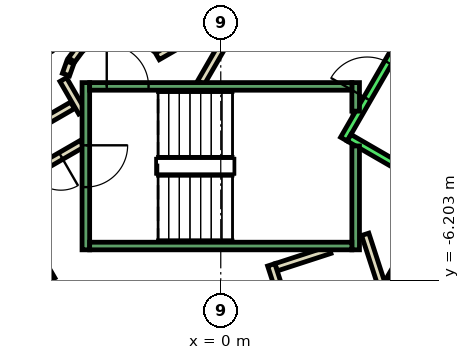
"""IFC4 building model, lengths in metres.
Left out: names, types, materials, properties, quantities, classifications, styles, units other than length and angle.
Written with IfcOpenShell. Run it as: python <this file> out.ifc"""

import sys

from ifc_helpers import new_model, si_unit, direction, frame, frame_2d, origin, place, context, subcontext, project, spatial, rectangle, extrude, element, fill, save


model = new_model("IFC4")
c1 = context("Model", 3, precision=1e-05, world=origin(), true_north=direction((0.0, 1.0)))
c2 = subcontext(c1, "Body", "Model", "MODEL_VIEW")
j1 = project(units=[si_unit("LENGTHUNIT", "METRE"), si_unit("PLANEANGLEUNIT", "RADIAN")], contexts=[c1])
p1 = place(None, origin())
s1 = spatial("IfcSite", under=j1, at=p1, CompositionType="ELEMENT")
p2 = place(p1, origin())
s2 = spatial("IfcBuilding", under=s1, at=p2, CompositionType="ELEMENT")
p3 = place(p2, frame((0.0, 0.0, 30.0)))
s3 = spatial("IfcBuildingStorey", under=s2, at=p3, CompositionType="ELEMENT", Elevation=30.0)
p4 = place(p3, frame((-3.9, -1.599, 0.0), z_axis=(0.0, 0.0, 1.0), x_axis=(-0.865969445389, -0.500096910261, 0.0)))
e1 = element("IfcWall", 1, at=p4, inside=s3, PredefinedType="PARTITIONING", context=c2, shape_type="SweptSolid", body=[
    extrude(rectangle(XDim=1.373, YDim=0.2, at=frame_2d((0.687, 0.0))), origin(), (0.0, 0.0, 1.0), 4.4),
])
p5 = place(p3, frame((-4.145, -0.92, 0.0), z_axis=(0.0, 0.0, 1.0), x_axis=(0.499743786207, -0.866173278362, 0.0)))
e2 = element("IfcWall", 2, at=p5, inside=s3, PredefinedType="PARTITIONING", context=c2, shape_type="SweptSolid", body=[
    extrude(rectangle(XDim=0.991, YDim=0.2, at=frame_2d((0.495, 0.0))), origin(), (0.0, 0.0, 1.0), 4.4),
])
p6 = place(p3, frame((-3.65, -2.61, 0.0), z_axis=(0.0, 0.0, 1.0), x_axis=(-0.866072462134, -0.499918483688, 0.0)))
e3 = element("IfcWall", 3, at=p6, inside=s3, PredefinedType="PARTITIONING", context=c2, shape_type="SweptSolid", body=[
    extrude(rectangle(XDim=2.084, YDim=0.2, at=frame_2d((1.042, 0.0))), origin(), (0.0, 0.0, 1.0), 4.4),
])
p7 = place(p6, frame((0.642, 0.0, 0.0)))
e4 = element("IfcOpeningElement", 4, at=p7, cuts=e3, PredefinedType="OPENING", context=c2, shape_type="SweptSolid", body=[
    extrude(rectangle(XDim=0.9, YDim=2.1, at=frame_2d((0.45, 1.05))), frame((0.0, 0.11, 0.0), z_axis=(0.0, -1.0, 0.0), x_axis=(1.0, 0.0, 0.0)), (0.0, 0.0, 1.0), 0.22),
])
p8 = place(p3, frame((2.869, -5.4, 0.0), z_axis=(0.0, 0.0, 1.0), x_axis=(-0.950892787506, -0.309520446287, 0.0)))
e5 = element("IfcWall", 5, at=p8, inside=s3, PredefinedType="PARTITIONING", context=c2, shape_type="SweptSolid", body=[
    extrude(rectangle(XDim=1.487, YDim=0.2, at=frame_2d((0.743, 0.0))), origin(), (0.0, 0.0, 1.0), 4.4),
])
p9 = place(p3, frame((1.328, -5.795, 0.0), z_axis=(0.0, 0.0, 1.0), x_axis=(0.309171157328, -0.951006411901, 0.0)))
e6 = element("IfcWall", 6, at=p9, inside=s3, PredefinedType="PARTITIONING", context=c2, shape_type="SweptSolid", body=[
    extrude(rectangle(XDim=2.401, YDim=0.2, at=frame_2d((1.2, 0.0))), origin(), (0.0, 0.0, 1.0), 4.4),
])
p10 = place(p9, frame((0.75, 0.0, 0.0)))
e7 = element("IfcOpeningElement", 7, at=p10, cuts=e6, PredefinedType="OPENING", context=c2, shape_type="SweptSolid", body=[
    extrude(rectangle(XDim=0.9, YDim=2.1, at=frame_2d((0.45, 1.05))), frame((0.0, 0.11, 0.0), z_axis=(0.0, -1.0, 0.0), x_axis=(1.0, 0.0, 0.0)), (0.0, 0.0, 1.0), 0.22),
])
p11 = place(p3, frame((4.543, -7.275, 0.0), z_axis=(0.0, 0.0, 1.0), x_axis=(-0.309079173229, 0.951036310914, 0.0)))
e8 = element("IfcWall", 8, at=p11, inside=s3, PredefinedType="PARTITIONING", context=c2, shape_type="SweptSolid", body=[
    extrude(rectangle(XDim=2.4, YDim=0.2, at=frame_2d((1.2, 0.0))), origin(), (0.0, 0.0, 1.0), 4.4),
])
p12 = place(p3, frame((-0.52, -1.0, 0.0), z_axis=(0.0, 0.0, 1.0), x_axis=(0.50011622646, 0.865958290007, 0.0)))
e9 = element("IfcWall", 9, at=p12, inside=s3, PredefinedType="PARTITIONING", context=c2, shape_type="SweptSolid", body=[
    extrude(rectangle(XDim=4.991, YDim=0.2, at=frame_2d((2.496, 0.0))), origin(), (0.0, 0.0, 1.0), 4.4),
])
p13 = place(p12, frame((1.945, 0.0, 0.0)))
e10 = element("IfcOpeningElement", 10, at=p13, cuts=e9, PredefinedType="OPENING", context=c2, shape_type="SweptSolid", body=[
    extrude(rectangle(XDim=1.0, YDim=2.1, at=frame_2d((0.5, 1.05))), frame((0.0, 0.11, 0.0), z_axis=(0.0, -1.0, 0.0), x_axis=(1.0, 0.0, 0.0)), (0.0, 0.0, 1.0), 0.22),
])
p14 = place(p3, frame((-0.412, 0.414, 0.0), z_axis=(0.0, 0.0, 1.0), x_axis=(-0.866017369001, -0.500013916395, 0.0)))
e11 = element("IfcWall", 11, at=p14, inside=s3, PredefinedType="PARTITIONING", context=c2, shape_type="SweptSolid", body=[
    extrude(rectangle(XDim=1.45, YDim=0.2, at=frame_2d((0.725, 0.0))), origin(), (0.0, 0.0, 1.0), 4.4),
])
p15 = place(p3, frame((-3.723, -0.131, 0.0), z_axis=(0.0, 0.0, 1.0), x_axis=(-0.594675113454, -0.803966112121, 0.0)))
e12 = element("IfcWall", 12, at=p15, inside=s3, PredefinedType="PARTITIONING", context=c2, shape_type="SweptSolid", body=[
    extrude(rectangle(XDim=0.338, YDim=0.2, at=frame_2d((0.169, 0.0))), origin(), (0.0, 0.0, 1.0), 4.4),
])
p16 = place(p3, frame((-3.96, -0.47, 0.0), z_axis=(0.0, 0.0, 1.0), x_axis=(-0.334824194261, -0.942280615813, 0.0)))
e13 = element("IfcWall", 13, at=p16, inside=s3, PredefinedType="PARTITIONING", context=c2, shape_type="SweptSolid", body=[
    extrude(rectangle(XDim=0.338, YDim=0.2, at=frame_2d((0.169, 0.0))), origin(), (0.0, 0.0, 1.0), 4.4),
])
p17 = place(p3, frame((-9.751, 2.99, 0.0), z_axis=(0.0, 0.0, 1.0), x_axis=(0.50000090737, -0.866024879913, 0.0)))
e14 = element("IfcWall", 14, at=p17, inside=s3, PredefinedType="STANDARD", context=c2, shape_type="SweptSolid", body=[
    extrude(rectangle(XDim=10.6, YDim=0.2, at=frame_2d((5.3, 0.0))), origin(), (0.0, 0.0, 1.0), 4.4),
])
p18 = place(p3, frame((3.24, -2.488, 0.0), z_axis=(0.0, 0.0, 1.0), x_axis=(0.49994636267, 0.866056369097, 0.0)))
e15 = element("IfcWall", 15, at=p18, inside=s3, PredefinedType="STANDARD", context=c2, shape_type="SweptSolid", body=[
    extrude(rectangle(XDim=2.8, YDim=0.2, at=frame_2d((1.4, 0.0))), origin(), (0.0, 0.0, 1.0), 4.4),
])
p19 = place(p18, frame((1.225, 0.0, 0.0)))
e16 = element("IfcOpeningElement", 16, at=p19, cuts=e15, PredefinedType="OPENING", context=c2, shape_type="SweptSolid", body=[
    extrude(rectangle(XDim=1.1, YDim=2.1, at=frame_2d((0.55, 1.05))), frame((0.0, 0.11, 0.0), z_axis=(0.0, -1.0, 0.0), x_axis=(1.0, 0.0, 0.0)), (0.0, 0.0, 1.0), 0.22),
])
p20 = place(p3, frame((3.377, -2.452, 0.0), z_axis=(0.0, 0.0, 1.0), x_axis=(0.865955154139, -0.50012165622, 0.0)))
e17 = element("IfcWall", 17, at=p20, inside=s3, PredefinedType="STANDARD", context=c2, shape_type="SweptSolid", body=[
    extrude(rectangle(XDim=2.4, YDim=0.2, at=frame_2d((1.2, 0.0))), origin(), (0.0, 0.0, 1.0), 4.4),
])
p21 = place(p3, frame((4.451, -6.19, 0.0), z_axis=(0.0, 0.0, 1.0), x_axis=(0.50000090737, 0.866024879913, 0.0)))
e18 = element("IfcWall", 18, at=p21, inside=s3, PredefinedType="STANDARD", context=c2, shape_type="SweptSolid", body=[
    extrude(rectangle(XDim=10.6, YDim=0.2, at=frame_2d((5.3, 0.0))), origin(), (0.0, 0.0, 1.0), 4.4),
])
p22 = place(p3, frame((-3.55, -1.0, 0.0), z_axis=(0.0, 0.0, 1.0), x_axis=(0.0, -1.0, 0.0)))
e19 = element("IfcWall", 19, at=p22, inside=s3, PredefinedType="STANDARD", context=c2, shape_type="SweptSolid", body=[
    extrude(rectangle(XDim=4.4, YDim=0.2, at=frame_2d((2.2, 0.0))), origin(), (0.0, 0.0, 1.0), 4.4),
])
p23 = place(p22, frame((1.65, 0.0, 0.0)))
e20 = element("IfcOpeningElement", 20, at=p23, cuts=e19, PredefinedType="OPENING", context=c2, shape_type="SweptSolid", body=[
    extrude(rectangle(XDim=1.1, YDim=2.2, at=frame_2d((0.55, 1.1))), frame((0.0, 0.11, 0.0), z_axis=(0.0, -1.0, 0.0), x_axis=(1.0, 0.0, 0.0)), (0.0, 0.0, 1.0), 0.22),
])
p24 = place(p3, frame((3.55, -2.667, 0.0), z_axis=(0.0, 0.0, 1.0), x_axis=(0.0, -1.0, 0.0)))
e21 = element("IfcWall", 21, at=p24, inside=s3, PredefinedType="STANDARD", context=c2, shape_type="SweptSolid", body=[
    extrude(rectangle(XDim=2.733, YDim=0.2, at=frame_2d((1.366, 0.0))), origin(), (0.0, 0.0, 1.0), 4.4),
])
p25 = place(p3, frame((3.55, -1.0, 0.0), z_axis=(0.0, 0.0, 1.0), x_axis=(0.0, -1.0, 0.0)))
e22 = element("IfcWall", 22, at=p25, inside=s3, PredefinedType="STANDARD", context=c2, shape_type="SweptSolid", body=[
    extrude(rectangle(XDim=0.751, YDim=0.2, at=frame_2d((0.375, 0.0))), origin(), (0.0, 0.0, 1.0), 4.4),
])
p26 = place(p3, frame((-3.45, -1.1, 0.0), z_axis=(0.0, 0.0, 1.0), x_axis=(1.0, 0.0, 0.0)))
e23 = element("IfcWall", 23, at=p26, inside=s3, PredefinedType="STANDARD", context=c2, shape_type="SweptSolid", body=[
    extrude(rectangle(XDim=6.9, YDim=0.2, at=frame_2d((3.45, 0.0))), origin(), (0.0, 0.0, 1.0), 4.4),
])
p27 = place(p26, frame((0.45, 0.0, 0.0)))
e24 = element("IfcOpeningElement", 24, at=p27, cuts=e23, PredefinedType="OPENING", context=c2, shape_type="SweptSolid", body=[
    extrude(rectangle(XDim=1.1, YDim=2.2, at=frame_2d((0.55, 1.1))), frame((0.0, 0.11, 0.0), z_axis=(0.0, -1.0, 0.0), x_axis=(1.0, 0.0, 0.0)), (0.0, 0.0, 1.0), 0.22),
])
p28 = place(p3, frame((-3.45, -5.3, 0.0), z_axis=(0.0, 0.0, 1.0), x_axis=(1.0, 0.0, 0.0)))
e25 = element("IfcWall", 25, at=p28, inside=s3, PredefinedType="STANDARD", context=c2, shape_type="SweptSolid", body=[
    extrude(rectangle(XDim=6.9, YDim=0.2, at=frame_2d((3.45, 0.0))), origin(), (0.0, 0.0, 1.0), 4.4),
])
p29 = place(p7, origin())
e26 = element("IfcDoor", 26, at=p29, inside=s3, OperationType="SINGLE_SWING_LEFT", PredefinedType="DOOR", context=c2, shape_type="SweptSolid", body=[
    extrude(rectangle(XDim=0.9, YDim=2.1, at=frame_2d((0.45, 1.05))), frame((0.0, 0.025, 0.0), z_axis=(0.0, -1.0, 0.0), x_axis=(1.0, 0.0, 0.0)), (0.0, 0.0, 1.0), 0.05),
])
fill(e4, e26)
p30 = place(p19, origin())
e27 = element("IfcDoor", 27, at=p30, inside=s3, OperationType="SLIDING_TO_LEFT", PredefinedType="DOOR", context=c2, shape_type="SweptSolid", body=[
    extrude(rectangle(XDim=1.1, YDim=2.1, at=frame_2d((0.55, 1.05))), frame((0.0, 0.025, 0.0), z_axis=(0.0, -1.0, 0.0), x_axis=(1.0, 0.0, 0.0)), (0.0, 0.0, 1.0), 0.05),
])
fill(e16, e27)
p31 = place(p27, origin())
e28 = element("IfcDoor", 28, at=p31, inside=s3, OperationType="SINGLE_SWING_LEFT", PredefinedType="DOOR", context=c2, shape_type="SweptSolid", body=[
    extrude(rectangle(XDim=1.1, YDim=2.2, at=frame_2d((0.55, 1.1))), frame((0.0, 0.025, 0.0), z_axis=(0.0, -1.0, 0.0), x_axis=(1.0, 0.0, 0.0)), (0.0, 0.0, 1.0), 0.05),
])
fill(e24, e28)
p32 = place(p23, origin())
e29 = element("IfcDoor", 29, at=p32, inside=s3, OperationType="SINGLE_SWING_LEFT", PredefinedType="DOOR", context=c2, shape_type="SweptSolid", body=[
    extrude(rectangle(XDim=1.1, YDim=2.2, at=frame_2d((0.55, 1.1))), frame((0.0, 0.025, 0.0), z_axis=(0.0, -1.0, 0.0), x_axis=(1.0, 0.0, 0.0)), (0.0, 0.0, 1.0), 0.05),
])
fill(e20, e29)
save(model, sys.argv[1])
